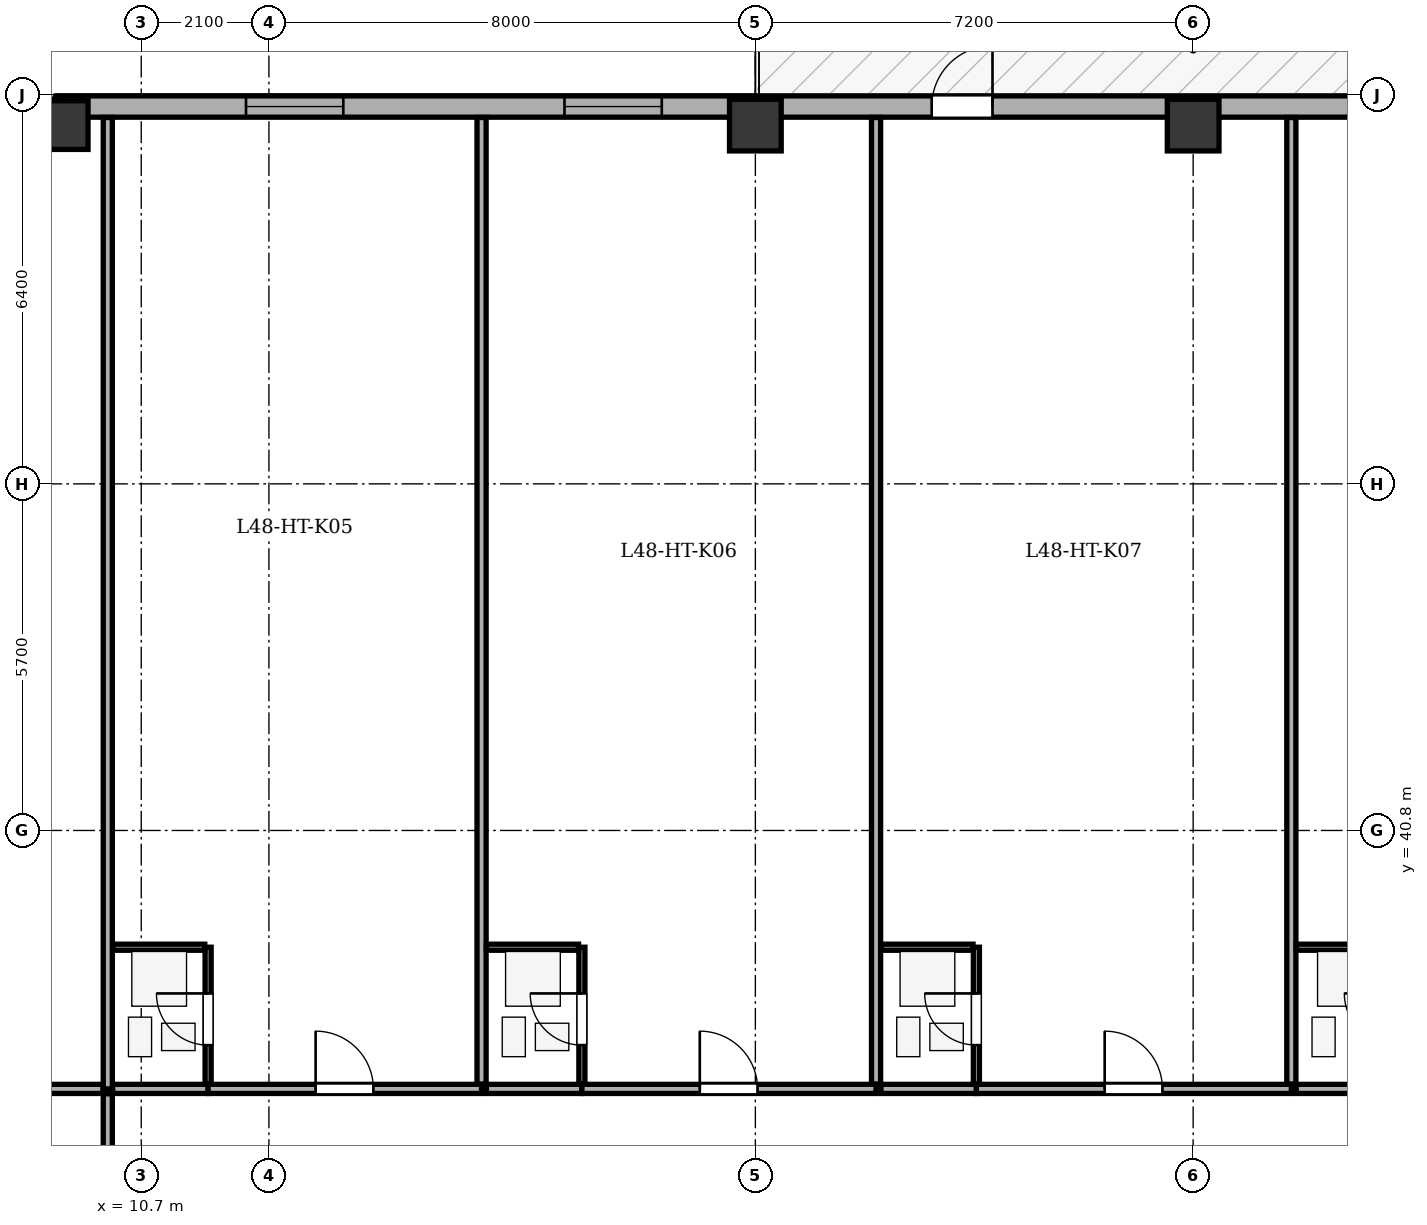
"""IFC4 building model, lengths in metres.
Left out: names, types, materials, properties, quantities, classifications, styles, units other than length and angle.
Written with IfcOpenShell. Run it as: python <this file> out.ifc"""

import sys

from ifc_helpers import new_model, si_unit, direction, frame, frame_2d, origin, origin_2d, place, context, subcontext, project, spatial, rectangle, extrude, element, fill, save


model = new_model("IFC4")
c1 = context("Model", 3, precision=1e-05, world=origin(), true_north=direction((0.0, 1.0)))
c2 = subcontext(c1, "Body", "Model", "MODEL_VIEW")
j1 = project(units=[si_unit("LENGTHUNIT", "METRE"), si_unit("PLANEANGLEUNIT", "RADIAN")], contexts=[c1])
p1 = place(None, origin())
s1 = spatial("IfcSite", under=j1, at=p1, CompositionType="ELEMENT")
p2 = place(p1, origin())
s2 = spatial("IfcBuilding", under=s1, at=p2, CompositionType="ELEMENT")
p3 = place(p2, frame((0.0, 0.0, 186.8)))
s3 = spatial("IfcBuildingStorey", under=s2, at=p3, CompositionType="ELEMENT", Elevation=186.8)
p4 = place(p3, frame((9.3, 52.4, 0.0), z_axis=(0.0, 0.0, 1.0), x_axis=(1.0, 0.0, 0.0)))
e1 = element("IfcColumn", 1, at=p4, inside=s3, PredefinedType="COLUMN", context=c2, shape_type="SweptSolid", body=[
    extrude(rectangle(XDim=0.8, YDim=1.05, at=origin_2d()), origin(), (0.0, 0.0, 1.0), 3.5),
])
for number, where, z_axis, x_axis in (
    (2, (20.8, 52.4, 0.0), (0.0, 0.0, 1.0), (1.0, 0.0, 0.0)),
    (3, (28.0, 52.4, 0.0), (0.0, 0.0, 1.0), (1.0, 0.0, 0.0)),
):
    element("IfcColumn", number, at=place(p3, frame(where, z_axis=z_axis, x_axis=x_axis)), inside=s3, PredefinedType="COLUMN", context=c2, shape_type="SweptSolid", body=[
        extrude(rectangle(XDim=0.85, YDim=0.85, at=origin_2d()), origin(), (0.0, 0.0, 1.0), 3.5),
    ])
p5 = place(p3, frame((4.495, 47.9, 0.0), z_axis=(0.0, 0.0, 1.0), x_axis=(0.707088817216, 0.7071247447, 0.0)))
e4 = element("IfcWall", 4, at=p5, inside=s3, PredefinedType="STANDARD", context=c2, shape_type="SweptSolid", body=[
    extrude(rectangle(XDim=6.795, YDim=0.35, at=frame_2d((3.398, 0.0))), origin(), (0.0, 0.0, 1.0), 2.785),
])
p6 = place(p5, frame((2.698, 0.0, 0.75)))
e5 = element("IfcOpeningElement", 5, at=p6, cuts=e4, PredefinedType="OPENING", context=c2, shape_type="SweptSolid", body=[
    extrude(rectangle(XDim=1.4, YDim=1.65, at=frame_2d((0.7, 0.825))), frame((0.0, 0.185, 0.0), z_axis=(0.0, -1.0, 0.0), x_axis=(1.0, 0.0, 0.0)), (0.0, 0.0, 1.0), 0.37),
])
p7 = place(p3, frame((9.3, 52.705, 0.0), z_axis=(0.0, 0.0, 1.0), x_axis=(1.0, 0.0, 0.0)))
e6 = element("IfcWall", 6, at=p7, inside=s3, PredefinedType="STANDARD", context=c2, shape_type="SweptSolid", body=[
    extrude(rectangle(XDim=35.0, YDim=0.35, at=frame_2d((17.5, 0.0))), origin(), (0.0, 0.0, 1.0), 2.785),
])
p8 = place(p7, frame((14.4, 0.0, 0.0)))
e7 = element("IfcOpeningElement", 7, at=p8, cuts=e6, PredefinedType="OPENING", context=c2, shape_type="SweptSolid", body=[
    extrude(rectangle(XDim=1.0, YDim=2.02, at=frame_2d((0.5, 1.01))), frame((0.0, 0.185, 0.0), z_axis=(0.0, -1.0, 0.0), x_axis=(1.0, 0.0, 0.0)), (0.0, 0.0, 1.0), 0.37),
])
p9 = place(p7, frame((3.123, 0.0, 0.75)))
e8 = element("IfcOpeningElement", 8, at=p9, cuts=e6, PredefinedType="OPENING", context=c2, shape_type="SweptSolid", body=[
    extrude(rectangle(XDim=1.6, YDim=1.75, at=frame_2d((0.8, 0.875))), frame((0.0, 0.185, 0.0), z_axis=(0.0, -1.0, 0.0), x_axis=(1.0, 0.0, 0.0)), (0.0, 0.0, 1.0), 0.37),
])
p10 = place(p7, frame((8.361, 0.0, 0.75)))
e9 = element("IfcOpeningElement", 9, at=p10, cuts=e6, PredefinedType="OPENING", context=c2, shape_type="SweptSolid", body=[
    extrude(rectangle(XDim=1.6, YDim=1.75, at=frame_2d((0.8, 0.875))), frame((0.0, 0.185, 0.0), z_axis=(0.0, -1.0, 0.0), x_axis=(1.0, 0.0, 0.0)), (0.0, 0.0, 1.0), 0.37),
])
p11 = place(p7, frame((22.22, 0.0, 0.75)))
e10 = element("IfcOpeningElement", 10, at=p11, cuts=e6, PredefinedType="OPENING", context=c2, shape_type="SweptSolid", body=[
    extrude(rectangle(XDim=1.6, YDim=1.75, at=frame_2d((0.8, 0.875))), frame((0.0, 0.185, 0.0), z_axis=(0.0, -1.0, 0.0), x_axis=(1.0, 0.0, 0.0)), (0.0, 0.0, 1.0), 0.37),
])
p12 = place(p7, frame((28.809, 0.0, 0.75)))
e11 = element("IfcOpeningElement", 11, at=p12, cuts=e6, PredefinedType="OPENING", context=c2, shape_type="SweptSolid", body=[
    extrude(rectangle(XDim=1.6, YDim=1.75, at=frame_2d((0.8, 0.875))), frame((0.0, 0.185, 0.0), z_axis=(0.0, -1.0, 0.0), x_axis=(1.0, 0.0, 0.0)), (0.0, 0.0, 1.0), 0.37),
])
p13 = place(p7, frame((31.803, 0.0, 0.75)))
e12 = element("IfcOpeningElement", 12, at=p13, cuts=e6, PredefinedType="OPENING", context=c2, shape_type="SweptSolid", body=[
    extrude(rectangle(XDim=1.6, YDim=1.75, at=frame_2d((0.8, 0.875))), frame((0.0, 0.185, 0.0), z_axis=(0.0, -1.0, 0.0), x_axis=(1.0, 0.0, 0.0)), (0.0, 0.0, 1.0), 0.37),
])
p14 = place(p3, frame((10.15, 36.55, 0.0), z_axis=(0.0, 0.0, 1.0), x_axis=(0.0, 1.0, 0.0)))
e13 = element("IfcWall", 13, at=p14, inside=s3, PredefinedType="PARTITIONING", context=c2, shape_type="SweptSolid", body=[
    extrude(rectangle(XDim=15.975, YDim=0.15, at=frame_2d((7.987, 0.0))), origin(), (0.0, 0.0, 1.0), 3.2),
])
p15 = place(p3, frame((10.23, 36.55, 0.0), z_axis=(0.0, 0.0, 1.0), x_axis=(1.0, 0.0, 0.0)))
e14 = element("IfcWall", 14, at=p15, inside=s3, PredefinedType="PARTITIONING", context=c2, shape_type="SweptSolid", body=[
    extrude(rectangle(XDim=1.57, YDim=0.15, at=frame_2d((0.785, 0.0))), origin(), (0.0, 0.0, 1.0), 3.2),
])
p16 = place(p3, frame((11.8, 36.55, 0.0), z_axis=(0.0, 0.0, 1.0), x_axis=(1.0, 0.0, 0.0)))
e15 = element("IfcWall", 15, at=p16, inside=s3, PredefinedType="PARTITIONING", context=c2, shape_type="SweptSolid", body=[
    extrude(rectangle(XDim=4.497, YDim=0.15, at=frame_2d((2.249, 0.0))), origin(), (0.0, 0.0, 1.0), 3.2),
])
p17 = place(p16, frame((1.768, 0.0, 0.0)))
e16 = element("IfcOpeningElement", 16, at=p17, cuts=e15, PredefinedType="OPENING", context=c2, shape_type="SweptSolid", body=[
    extrude(rectangle(XDim=0.95, YDim=2.1, at=frame_2d((0.475, 1.05))), frame((0.0, 0.085, 0.0), z_axis=(0.0, -1.0, 0.0), x_axis=(1.0, 0.0, 0.0)), (0.0, 0.0, 1.0), 0.17),
])
p18 = place(p3, frame((11.8, 36.63, 0.0), z_axis=(0.0, 0.0, 1.0), x_axis=(0.0, 1.0, 0.0)))
e17 = element("IfcWall", 17, at=p18, inside=s3, PredefinedType="PARTITIONING", context=c2, shape_type="SweptSolid", body=[
    extrude(rectangle(XDim=2.25, YDim=0.1, at=frame_2d((1.125, 0.0))), origin(), (0.0, 0.0, 1.0), 3.2),
])
p19 = place(p18, frame((0.64, 0.0, 0.0)))
e18 = element("IfcOpeningElement", 18, at=p19, cuts=e17, PredefinedType="OPENING", context=c2, shape_type="SweptSolid", body=[
    extrude(rectangle(XDim=0.85, YDim=2.05, at=frame_2d((0.425, 1.025))), frame((0.0, 0.06, 0.0), z_axis=(0.0, -1.0, 0.0), x_axis=(1.0, 0.0, 0.0)), (0.0, 0.0, 1.0), 0.12),
])
p20 = place(p3, frame((10.23, 38.88, 0.0), z_axis=(0.0, 0.0, 1.0), x_axis=(1.0, 0.0, 0.0)))
e19 = element("IfcWall", 19, at=p20, inside=s3, PredefinedType="PARTITIONING", context=c2, shape_type="SweptSolid", body=[
    extrude(rectangle(XDim=1.515, YDim=0.1, at=frame_2d((0.758, 0.0))), origin(), (0.0, 0.0, 1.0), 3.2),
])
p21 = place(p3, frame((16.297, 36.63, 0.0), z_axis=(0.0, 0.0, 1.0), x_axis=(0.0, 1.0, 0.0)))
e20 = element("IfcWall", 20, at=p21, inside=s3, PredefinedType="PARTITIONING", context=c2, shape_type="SweptSolid", body=[
    extrude(rectangle(XDim=15.895, YDim=0.15, at=frame_2d((7.948, 0.0))), origin(), (0.0, 0.0, 1.0), 3.2),
])
p22 = place(p3, frame((16.377, 36.55, 0.0), z_axis=(0.0, 0.0, 1.0), x_axis=(1.0, 0.0, 0.0)))
e21 = element("IfcWall", 21, at=p22, inside=s3, PredefinedType="PARTITIONING", context=c2, shape_type="SweptSolid", body=[
    extrude(rectangle(XDim=1.57, YDim=0.15, at=frame_2d((0.785, 0.0))), origin(), (0.0, 0.0, 1.0), 3.2),
])
p23 = place(p3, frame((17.947, 36.55, 0.0), z_axis=(0.0, 0.0, 1.0), x_axis=(1.0, 0.0, 0.0)))
e22 = element("IfcWall", 22, at=p23, inside=s3, PredefinedType="PARTITIONING", context=c2, shape_type="SweptSolid", body=[
    extrude(rectangle(XDim=4.838, YDim=0.15, at=frame_2d((2.419, 0.0))), origin(), (0.0, 0.0, 1.0), 3.2),
])
p24 = place(p23, frame((1.939, 0.0, 0.0)))
e23 = element("IfcOpeningElement", 23, at=p24, cuts=e22, PredefinedType="OPENING", context=c2, shape_type="SweptSolid", body=[
    extrude(rectangle(XDim=0.95, YDim=2.1, at=frame_2d((0.475, 1.05))), frame((0.0, 0.085, 0.0), z_axis=(0.0, -1.0, 0.0), x_axis=(1.0, 0.0, 0.0)), (0.0, 0.0, 1.0), 0.17),
])
p25 = place(p3, frame((17.947, 36.63, 0.0), z_axis=(0.0, 0.0, 1.0), x_axis=(0.0, 1.0, 0.0)))
e24 = element("IfcWall", 24, at=p25, inside=s3, PredefinedType="PARTITIONING", context=c2, shape_type="SweptSolid", body=[
    extrude(rectangle(XDim=2.25, YDim=0.1, at=frame_2d((1.125, 0.0))), origin(), (0.0, 0.0, 1.0), 3.2),
])
p26 = place(p25, frame((0.64, 0.0, 0.0)))
e25 = element("IfcOpeningElement", 25, at=p26, cuts=e24, PredefinedType="OPENING", context=c2, shape_type="SweptSolid", body=[
    extrude(rectangle(XDim=0.85, YDim=2.05, at=frame_2d((0.425, 1.025))), frame((0.0, 0.06, 0.0), z_axis=(0.0, -1.0, 0.0), x_axis=(1.0, 0.0, 0.0)), (0.0, 0.0, 1.0), 0.12),
])
p27 = place(p3, frame((16.377, 38.88, 0.0), z_axis=(0.0, 0.0, 1.0), x_axis=(1.0, 0.0, 0.0)))
e26 = element("IfcWall", 26, at=p27, inside=s3, PredefinedType="PARTITIONING", context=c2, shape_type="SweptSolid", body=[
    extrude(rectangle(XDim=1.515, YDim=0.1, at=frame_2d((0.758, 0.0))), origin(), (0.0, 0.0, 1.0), 3.2),
])
p28 = place(p3, frame((22.785, 36.63, 0.0), z_axis=(0.0, 0.0, 1.0), x_axis=(0.0, 1.0, 0.0)))
e27 = element("IfcWall", 27, at=p28, inside=s3, PredefinedType="PARTITIONING", context=c2, shape_type="SweptSolid", body=[
    extrude(rectangle(XDim=15.895, YDim=0.15, at=frame_2d((7.948, 0.0))), origin(), (0.0, 0.0, 1.0), 3.2),
])
p29 = place(p3, frame((22.865, 36.55, 0.0), z_axis=(0.0, 0.0, 1.0), x_axis=(1.0, 0.0, 0.0)))
e28 = element("IfcWall", 28, at=p29, inside=s3, PredefinedType="PARTITIONING", context=c2, shape_type="SweptSolid", body=[
    extrude(rectangle(XDim=1.57, YDim=0.15, at=frame_2d((0.785, 0.0))), origin(), (0.0, 0.0, 1.0), 3.2),
])
p30 = place(p3, frame((24.435, 36.55, 0.0), z_axis=(0.0, 0.0, 1.0), x_axis=(1.0, 0.0, 0.0)))
e29 = element("IfcWall", 29, at=p30, inside=s3, PredefinedType="PARTITIONING", context=c2, shape_type="SweptSolid", body=[
    extrude(rectangle(XDim=5.18, YDim=0.15, at=frame_2d((2.59, 0.0))), origin(), (0.0, 0.0, 1.0), 3.2),
])
p31 = place(p30, frame((2.11, 0.0, 0.0)))
e30 = element("IfcOpeningElement", 30, at=p31, cuts=e29, PredefinedType="OPENING", context=c2, shape_type="SweptSolid", body=[
    extrude(rectangle(XDim=0.95, YDim=2.1, at=frame_2d((0.475, 1.05))), frame((0.0, 0.085, 0.0), z_axis=(0.0, -1.0, 0.0), x_axis=(1.0, 0.0, 0.0)), (0.0, 0.0, 1.0), 0.17),
])
p32 = place(p3, frame((24.435, 36.63, 0.0), z_axis=(0.0, 0.0, 1.0), x_axis=(0.0, 1.0, 0.0)))
e31 = element("IfcWall", 31, at=p32, inside=s3, PredefinedType="PARTITIONING", context=c2, shape_type="SweptSolid", body=[
    extrude(rectangle(XDim=2.25, YDim=0.1, at=frame_2d((1.125, 0.0))), origin(), (0.0, 0.0, 1.0), 3.2),
])
p33 = place(p32, frame((0.64, 0.0, 0.0)))
e32 = element("IfcOpeningElement", 32, at=p33, cuts=e31, PredefinedType="OPENING", context=c2, shape_type="SweptSolid", body=[
    extrude(rectangle(XDim=0.85, YDim=2.05, at=frame_2d((0.425, 1.025))), frame((0.0, 0.06, 0.0), z_axis=(0.0, -1.0, 0.0), x_axis=(1.0, 0.0, 0.0)), (0.0, 0.0, 1.0), 0.12),
])
p34 = place(p3, frame((22.865, 38.88, 0.0), z_axis=(0.0, 0.0, 1.0), x_axis=(1.0, 0.0, 0.0)))
e33 = element("IfcWall", 33, at=p34, inside=s3, PredefinedType="PARTITIONING", context=c2, shape_type="SweptSolid", body=[
    extrude(rectangle(XDim=1.515, YDim=0.1, at=frame_2d((0.757, 0.0))), origin(), (0.0, 0.0, 1.0), 3.2),
])
p35 = place(p3, frame((29.615, 36.63, 0.0), z_axis=(0.0, 0.0, 1.0), x_axis=(0.0, 1.0, 0.0)))
e34 = element("IfcWall", 34, at=p35, inside=s3, PredefinedType="PARTITIONING", context=c2, shape_type="SweptSolid", body=[
    extrude(rectangle(XDim=15.895, YDim=0.15, at=frame_2d((7.948, 0.0))), origin(), (0.0, 0.0, 1.0), 2.785),
])
p36 = place(p3, frame((29.695, 36.55, 0.0), z_axis=(0.0, 0.0, 1.0), x_axis=(1.0, 0.0, 0.0)))
e35 = element("IfcWall", 35, at=p36, inside=s3, PredefinedType="PARTITIONING", context=c2, shape_type="SweptSolid", body=[
    extrude(rectangle(XDim=1.641, YDim=0.15, at=frame_2d((0.821, 0.0))), origin(), (0.0, 0.0, 1.0), 3.2),
])
p37 = place(p3, frame((29.695, 38.88, 0.0), z_axis=(0.0, 0.0, 1.0), x_axis=(1.0, 0.0, 0.0)))
e36 = element("IfcWall", 36, at=p37, inside=s3, PredefinedType="PARTITIONING", context=c2, shape_type="SweptSolid", body=[
    extrude(rectangle(XDim=1.586, YDim=0.1, at=frame_2d((0.793, 0.0))), origin(), (0.0, 0.0, 1.0), 3.2),
])
p38 = place(p3, frame((4.675, 36.55, 0.0), z_axis=(0.0, 0.0, 1.0), x_axis=(1.0, 0.0, 0.0)))
e37 = element("IfcWall", 37, at=p38, inside=s3, PredefinedType="PARTITIONING", context=c2, shape_type="SweptSolid", body=[
    extrude(rectangle(XDim=5.395, YDim=0.15, at=frame_2d((2.698, 0.0))), origin(), (0.0, 0.0, 1.0), 3.2),
])
p39 = place(p3, frame((10.15, 17.93, 0.0), z_axis=(0.0, 0.0, 1.0), x_axis=(0.0, 1.0, 0.0)))
e38 = element("IfcWall", 38, at=p39, inside=s3, PredefinedType="PARTITIONING", context=c2, shape_type="SweptSolid", body=[
    extrude(rectangle(XDim=18.54, YDim=0.15, at=frame_2d((9.27, 0.0))), origin(), (0.0, 0.0, 1.0), 3.2),
])
p40 = place(p39, frame((8.79, 0.0, 0.0)))
e39 = element("IfcOpeningElement", 39, at=p40, cuts=e38, PredefinedType="OPENING", context=c2, shape_type="SweptSolid", body=[
    extrude(rectangle(XDim=0.95, YDim=2.1, at=frame_2d((0.475, 1.05))), frame((0.0, 0.085, 0.0), z_axis=(0.0, -1.0, 0.0), x_axis=(1.0, 0.0, 0.0)), (0.0, 0.0, 1.0), 0.17),
])
p41 = place(p8, origin())
e40 = element("IfcDoor", 40, at=p41, inside=s3, OperationType="SINGLE_SWING_RIGHT", PredefinedType="DOOR", context=c2, shape_type="SweptSolid", body=[
    extrude(rectangle(XDim=1.0, YDim=2.02, at=frame_2d((0.5, 1.01))), frame((0.0, 0.025, 0.0), z_axis=(0.0, -1.0, 0.0), x_axis=(1.0, 0.0, 0.0)), (0.0, 0.0, 1.0), 0.05),
])
fill(e7, e40)
p42 = place(p9, origin())
e41 = element("IfcWindow", 41, at=p42, inside=s3, PartitioningType="SINGLE_PANEL", PredefinedType="WINDOW", context=c2, shape_type="SweptSolid", body=[
    extrude(rectangle(XDim=1.6, YDim=1.75, at=frame_2d((0.8, 0.875))), frame((0.0, -0.01, 0.0), z_axis=(0.0, -1.0, 0.0), x_axis=(1.0, 0.0, 0.0)), (0.0, 0.0, 1.0), 0.06),
])
fill(e8, e41)
p43 = place(p10, origin())
e42 = element("IfcWindow", 42, at=p43, inside=s3, PartitioningType="SINGLE_PANEL", PredefinedType="WINDOW", context=c2, shape_type="SweptSolid", body=[
    extrude(rectangle(XDim=1.6, YDim=1.75, at=frame_2d((0.8, 0.875))), frame((0.0, -0.01, 0.0), z_axis=(0.0, -1.0, 0.0), x_axis=(1.0, 0.0, 0.0)), (0.0, 0.0, 1.0), 0.06),
])
fill(e9, e42)
p44 = place(p19, origin())
e43 = element("IfcDoor", 43, at=p44, inside=s3, OperationType="SINGLE_SWING_RIGHT", PredefinedType="DOOR", context=c2, shape_type="SweptSolid", body=[
    extrude(rectangle(XDim=0.85, YDim=2.05, at=frame_2d((0.425, 1.025))), frame((0.0, 0.025, 0.0), z_axis=(0.0, -1.0, 0.0), x_axis=(1.0, 0.0, 0.0)), (0.0, 0.0, 1.0), 0.05),
])
fill(e18, e43)
p45 = place(p17, origin())
e44 = element("IfcDoor", 44, at=p45, inside=s3, OperationType="SINGLE_SWING_LEFT", PredefinedType="DOOR", context=c2, shape_type="SweptSolid", body=[
    extrude(rectangle(XDim=0.95, YDim=2.1, at=frame_2d((0.475, 1.05))), frame((0.0, 0.025, 0.0), z_axis=(0.0, -1.0, 0.0), x_axis=(1.0, 0.0, 0.0)), (0.0, 0.0, 1.0), 0.05),
])
fill(e16, e44)
p46 = place(p26, origin())
e45 = element("IfcDoor", 45, at=p46, inside=s3, OperationType="SINGLE_SWING_RIGHT", PredefinedType="DOOR", context=c2, shape_type="SweptSolid", body=[
    extrude(rectangle(XDim=0.85, YDim=2.05, at=frame_2d((0.425, 1.025))), frame((0.0, 0.025, 0.0), z_axis=(0.0, -1.0, 0.0), x_axis=(1.0, 0.0, 0.0)), (0.0, 0.0, 1.0), 0.05),
])
fill(e25, e45)
p47 = place(p24, origin())
e46 = element("IfcDoor", 46, at=p47, inside=s3, OperationType="SINGLE_SWING_LEFT", PredefinedType="DOOR", context=c2, shape_type="SweptSolid", body=[
    extrude(rectangle(XDim=0.95, YDim=2.1, at=frame_2d((0.475, 1.05))), frame((0.0, 0.025, 0.0), z_axis=(0.0, -1.0, 0.0), x_axis=(1.0, 0.0, 0.0)), (0.0, 0.0, 1.0), 0.05),
])
fill(e23, e46)
p48 = place(p33, origin())
e47 = element("IfcDoor", 47, at=p48, inside=s3, OperationType="SINGLE_SWING_RIGHT", PredefinedType="DOOR", context=c2, shape_type="SweptSolid", body=[
    extrude(rectangle(XDim=0.85, YDim=2.05, at=frame_2d((0.425, 1.025))), frame((0.0, 0.025, 0.0), z_axis=(0.0, -1.0, 0.0), x_axis=(1.0, 0.0, 0.0)), (0.0, 0.0, 1.0), 0.05),
])
fill(e32, e47)
p49 = place(p31, origin())
e48 = element("IfcDoor", 48, at=p49, inside=s3, OperationType="SINGLE_SWING_LEFT", PredefinedType="DOOR", context=c2, shape_type="SweptSolid", body=[
    extrude(rectangle(XDim=0.95, YDim=2.1, at=frame_2d((0.475, 1.05))), frame((0.0, 0.025, 0.0), z_axis=(0.0, -1.0, 0.0), x_axis=(1.0, 0.0, 0.0)), (0.0, 0.0, 1.0), 0.05),
])
fill(e30, e48)
save(model, sys.argv[1])
